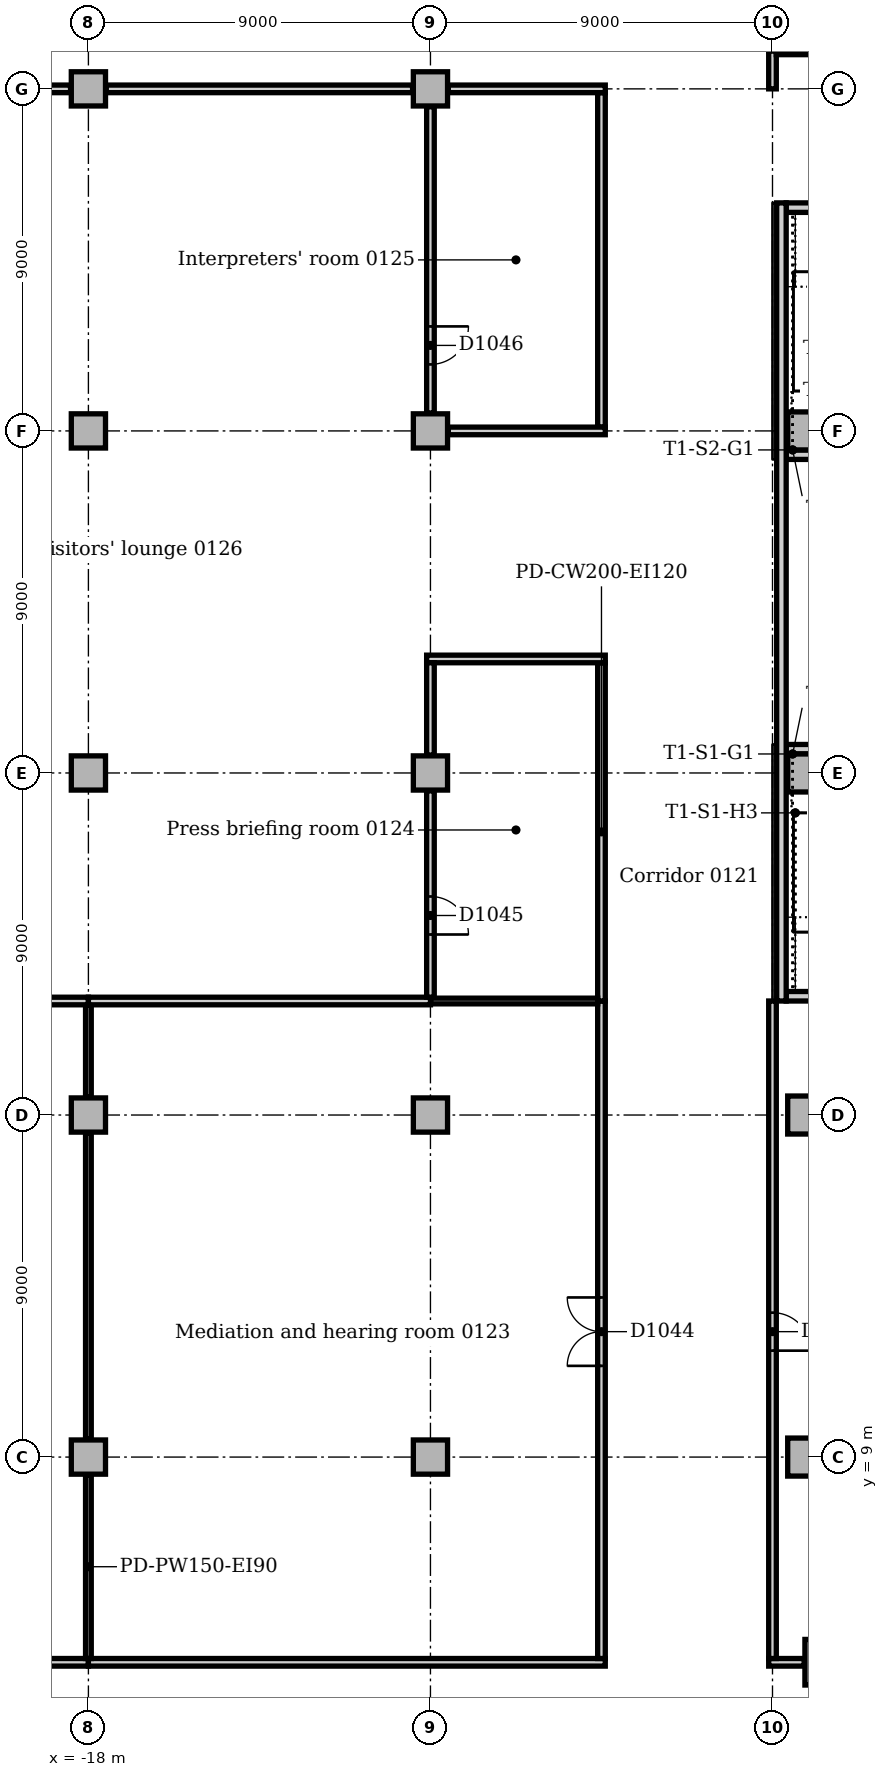
"""IFC4 building model, lengths in metres.
Left out: names, types, materials, properties, quantities, classifications, styles, units other than length and angle.
Written with IfcOpenShell. Run it as: python <this file> out.ifc"""

import sys

from ifc_helpers import new_model, si_unit, direction, frame, frame_2d, origin, origin_2d, place, context, subcontext, project, spatial, rectangle, extrude, element, fill, save


model = new_model("IFC4")
c1 = context("Model", 3, precision=1e-05, world=origin(), true_north=direction((0.0, 1.0)))
c2 = subcontext(c1, "Body", "Model", "MODEL_VIEW")
j1 = project(units=[si_unit("LENGTHUNIT", "METRE"), si_unit("PLANEANGLEUNIT", "RADIAN")], contexts=[c1])
p1 = place(None, origin())
s1 = spatial("IfcSite", under=j1, at=p1, CompositionType="ELEMENT")
p2 = place(p1, origin())
s2 = spatial("IfcBuilding", under=s1, at=p2, CompositionType="ELEMENT")
p3 = place(p2, frame((0.0, 0.0, 6.0)))
s3 = spatial("IfcBuildingStorey", under=s2, at=p3, CompositionType="ELEMENT", Elevation=6.0)
p4 = place(p3, frame((0.36, 21.125, 0.0), z_axis=(0.0, 0.0, 1.0), x_axis=(1.0, 0.0, 0.0)))
e1 = element("IfcWall", 1, at=p4, inside=s3, PredefinedType="SOLIDWALL", context=c2, shape_type="SweptSolid", body=[
    extrude(rectangle(XDim=3.54, YDim=0.25, at=frame_2d((1.77, 0.0))), origin(), (0.0, 0.0, 1.0), 5.0),
])
p5 = place(p3, frame((3.9, 27.625, 0.0), z_axis=(0.0, 0.0, 1.0), x_axis=(-1.0, 0.0, 0.0)))
e2 = element("IfcWall", 2, at=p5, inside=s3, PredefinedType="SOLIDWALL", context=c2, shape_type="SweptSolid", body=[
    extrude(rectangle(XDim=3.54, YDim=0.25, at=frame_2d((1.77, 0.0))), origin(), (0.0, 0.0, 1.0), 5.0),
])
p6 = place(p5, frame((0.4, 0.0, 0.0)))
e3 = element("IfcOpeningElement", 3, at=p6, cuts=e2, PredefinedType="OPENING", context=c2, shape_type="SweptSolid", body=[
    extrude(rectangle(XDim=1.0, YDim=2.1, at=frame_2d((0.5, 1.05))), frame((0.0, 0.135, 0.0), z_axis=(0.0, -1.0, 0.0), x_axis=(1.0, 0.0, 0.0)), (0.0, 0.0, 1.0), 0.27),
])
p7 = place(p3, frame((0.36, 35.375, 0.0), z_axis=(0.0, 0.0, 1.0), x_axis=(1.0, 0.0, 0.0)))
e4 = element("IfcWall", 4, at=p7, inside=s3, PredefinedType="SOLIDWALL", context=c2, shape_type="SweptSolid", body=[
    extrude(rectangle(XDim=3.54, YDim=0.25, at=frame_2d((1.77, 0.0))), origin(), (0.0, 0.0, 1.0), 5.0),
])
p8 = place(p7, frame((2.14, 0.0, 0.0)))
e5 = element("IfcOpeningElement", 5, at=p8, cuts=e4, PredefinedType="OPENING", context=c2, shape_type="SweptSolid", body=[
    extrude(rectangle(XDim=1.0, YDim=2.1, at=frame_2d((0.5, 1.05))), frame((0.0, 0.135, 0.0), z_axis=(0.0, -1.0, 0.0), x_axis=(1.0, 0.0, 0.0)), (0.0, 0.0, 1.0), 0.27),
])
p9 = place(p3, frame((3.9, 41.875, 0.0), z_axis=(0.0, 0.0, 1.0), x_axis=(-1.0, 0.0, 0.0)))
e6 = element("IfcWall", 6, at=p9, inside=s3, PredefinedType="SOLIDWALL", context=c2, shape_type="SweptSolid", body=[
    extrude(rectangle(XDim=3.54, YDim=0.25, at=frame_2d((1.77, 0.0))), origin(), (0.0, 0.0, 1.0), 5.0),
])
p10 = place(p3, frame((0.235, 21.0, 0.0), z_axis=(0.0, 0.0, 1.0), x_axis=(0.0, 1.0, 0.0)))
e7 = element("IfcWall", 7, at=p10, inside=s3, PredefinedType="SOLIDWALL", context=c2, shape_type="SweptSolid", body=[
    extrude(rectangle(XDim=21.0, YDim=0.25, at=frame_2d((10.5, 0.0))), origin(), (0.0, 0.0, 1.0), 5.0),
])
p11 = place(p3, frame((1.453, 3.602, 0.0), z_axis=(0.0, 0.0, 1.0), x_axis=(1.0, 0.0, 0.0)))
e8 = element("IfcColumn", 8, at=p11, inside=s3, PredefinedType="COLUMN", context=c2, shape_type="SweptSolid", body=[
    extrude(rectangle(XDim=1.2, YDim=1.2, at=origin_2d()), origin(), (0.0, 0.0, 1.0), 4.7),
])
for number, where, z_axis, x_axis in (
    (9, (0.9, 9.0, 0.0), (0.0, 0.0, 1.0), (1.0, 0.0, 0.0)),
    (10, (0.9, 18.0, 0.0), (0.0, 0.0, 1.0), (1.0, 0.0, 0.0)),
):
    element("IfcColumn", number, at=place(p3, frame(where, z_axis=z_axis, x_axis=x_axis)), inside=s3, PredefinedType="COLUMN", context=c2, shape_type="SweptSolid", body=[
        extrude(rectangle(XDim=1.0, YDim=1.0, at=origin_2d()), origin(), (0.0, 0.0, 1.0), 4.7),
    ])
for number, where, z_axis, x_axis in (
    (11, (0.9, 27.0, 0.0), (0.0, 0.0, 1.0), (1.0, 0.0, 0.0)),
    (12, (0.9, 36.0, 0.0), (0.0, 0.0, 1.0), (1.0, 0.0, 0.0)),
):
    element("IfcColumn", number, at=place(p3, frame(where, z_axis=z_axis, x_axis=x_axis)), inside=s3, PredefinedType="COLUMN", context=c2, shape_type="SweptSolid", body=[
        extrude(rectangle(XDim=1.0, YDim=1.0, at=origin_2d()), origin(), (0.0, 0.0, 1.0), 5.0),
    ])
for number, where, z_axis, x_axis in (
    (13, (-18.0, 9.0, 0.0), (0.0, 0.0, 1.0), (1.0, 0.0, 0.0)),
    (14, (-18.0, 18.0, 0.0), (0.0, 0.0, 1.0), (1.0, 0.0, 0.0)),
    (15, (-18.0, 27.0, 0.0), (0.0, 0.0, 1.0), (1.0, 0.0, 0.0)),
    (16, (-18.0, 36.0, 0.0), (0.0, 0.0, 1.0), (1.0, 0.0, 0.0)),
    (17, (-18.0, 45.0, 0.0), (0.0, 0.0, 1.0), (1.0, 0.0, 0.0)),
    (18, (-9.0, 9.0, 0.0), (0.0, 0.0, 1.0), (1.0, 0.0, 0.0)),
    (19, (-9.0, 18.0, 0.0), (0.0, 0.0, 1.0), (1.0, 0.0, 0.0)),
    (20, (-9.0, 27.0, 0.0), (0.0, 0.0, 1.0), (1.0, 0.0, 0.0)),
    (21, (-9.0, 36.0, 0.0), (0.0, 0.0, 1.0), (1.0, 0.0, 0.0)),
    (22, (-9.0, 45.0, 0.0), (0.0, 0.0, 1.0), (1.0, 0.0, 0.0)),
):
    element("IfcColumn", number, at=place(p3, frame(where, z_axis=z_axis, x_axis=x_axis)), inside=s3, PredefinedType="COLUMN", context=c2, shape_type="SweptSolid", body=[
        extrude(rectangle(XDim=0.9, YDim=0.9, at=origin_2d()), origin(), (0.0, 0.0, 1.0), 4.7),
    ])
p12 = place(p3, frame((-0.1, 3.6, 0.0), z_axis=(0.0, 0.0, 1.0), x_axis=(1.0, 0.0, 0.0)))
e23 = element("IfcWall", 23, at=p12, inside=s3, PredefinedType="PARTITIONING", context=c2, shape_type="SweptSolid", body=[
    extrude(rectangle(XDim=0.933, YDim=0.2, at=frame_2d((0.467, 0.0))), origin(), (0.0, 0.0, 1.0), 4.7),
])
p13 = place(p3, frame((0.0, 45.0, 0.0), z_axis=(0.0, 0.0, 1.0), x_axis=(0.0, 1.0, 0.0)))
e24 = element("IfcWall", 24, at=p13, inside=s3, PredefinedType="PARTITIONING", context=c2, shape_type="SweptSolid", body=[
    extrude(rectangle(XDim=1.0, YDim=0.2, at=frame_2d((0.5, 0.0))), origin(), (0.0, 0.0, 1.0), 4.7),
])
p14 = place(p3, frame((0.1, 46.0, 0.0), z_axis=(0.0, 0.0, 1.0), x_axis=(1.0, 0.0, 0.0)))
e25 = element("IfcWall", 25, at=p14, inside=s3, PredefinedType="PARTITIONING", context=c2, shape_type="SweptSolid", body=[
    extrude(rectangle(XDim=8.9, YDim=0.2, at=frame_2d((4.45, 0.0))), origin(), (0.0, 0.0, 1.0), 4.7),
])
p15 = place(p14, frame((3.9, 0.0, 0.0)))
e26 = element("IfcOpeningElement", 26, at=p15, cuts=e25, PredefinedType="OPENING", context=c2, shape_type="SweptSolid", body=[
    extrude(rectangle(XDim=1.0, YDim=2.1, at=frame_2d((0.5, 1.05))), frame((0.0, 0.11, 0.0), z_axis=(0.0, -1.0, 0.0), x_axis=(1.0, 0.0, 0.0)), (0.0, 0.0, 1.0), 0.22),
])
p16 = place(p3, frame((-27.0, 3.6, 0.0), z_axis=(0.0, 0.0, 1.0), x_axis=(1.0, 0.0, 0.0)))
e27 = element("IfcWall", 27, at=p16, inside=s3, PredefinedType="PARTITIONING", context=c2, shape_type="SweptSolid", body=[
    extrude(rectangle(XDim=9.0, YDim=0.2, at=frame_2d((4.5, 0.0))), origin(), (0.0, 0.0, 1.0), 4.7),
])
p17 = place(p16, frame((4.0, 0.0, 0.0)))
e28 = element("IfcOpeningElement", 28, at=p17, cuts=e27, PredefinedType="OPENING", context=c2, shape_type="SweptSolid", body=[
    extrude(rectangle(XDim=1.0, YDim=2.1, at=frame_2d((0.5, 1.05))), frame((0.0, 0.11, 0.0), z_axis=(0.0, -1.0, 0.0), x_axis=(1.0, 0.0, 0.0)), (0.0, 0.0, 1.0), 0.22),
])
p18 = place(p3, frame((-18.0, 3.6, 0.0), z_axis=(0.0, 0.0, 1.0), x_axis=(1.0, 0.0, 0.0)))
e29 = element("IfcWall", 29, at=p18, inside=s3, PredefinedType="PARTITIONING", context=c2, shape_type="SweptSolid", body=[
    extrude(rectangle(XDim=13.6, YDim=0.2, at=frame_2d((6.8, 0.0))), origin(), (0.0, 0.0, 1.0), 4.7),
])
p19 = place(p3, frame((-4.5, 3.7, 0.0), z_axis=(0.0, 0.0, 1.0), x_axis=(0.0, 1.0, 0.0)))
e30 = element("IfcWall", 30, at=p19, inside=s3, PredefinedType="PARTITIONING", context=c2, shape_type="SweptSolid", body=[
    extrude(rectangle(XDim=17.3, YDim=0.2, at=frame_2d((8.65, 0.0))), origin(), (0.0, 0.0, 1.0), 4.7),
])
p20 = place(p19, frame((7.7, 0.0, 0.0)))
e31 = element("IfcOpeningElement", 31, at=p20, cuts=e30, PredefinedType="OPENING", context=c2, shape_type="SweptSolid", body=[
    extrude(rectangle(XDim=1.8, YDim=2.1, at=frame_2d((0.9, 1.05))), frame((0.0, 0.11, 0.0), z_axis=(0.0, -1.0, 0.0), x_axis=(1.0, 0.0, 0.0)), (0.0, 0.0, 1.0), 0.22),
])
p21 = place(p3, frame((-4.5, 21.0, 0.0), z_axis=(0.0, 0.0, 1.0), x_axis=(0.0, 1.0, 0.0)))
e32 = element("IfcWall", 32, at=p21, inside=s3, PredefinedType="PARTITIONING", context=c2, shape_type="SweptSolid", body=[
    extrude(rectangle(XDim=8.9, YDim=0.2, at=frame_2d((4.45, 0.0))), origin(), (0.0, 0.0, 1.0), 4.7),
])
p22 = place(p3, frame((-4.5, 36.1, 0.0), z_axis=(0.0, 0.0, 1.0), x_axis=(0.0, 1.0, 0.0)))
e33 = element("IfcWall", 33, at=p22, inside=s3, PredefinedType="PARTITIONING", context=c2, shape_type="SweptSolid", body=[
    extrude(rectangle(XDim=8.8, YDim=0.2, at=frame_2d((4.4, 0.0))), origin(), (0.0, 0.0, 1.0), 4.7),
])
p23 = place(p3, frame((0.0, 3.7, 0.0), z_axis=(0.0, 0.0, 1.0), x_axis=(0.0, 1.0, 0.0)))
e34 = element("IfcWall", 34, at=p23, inside=s3, PredefinedType="PARTITIONING", context=c2, shape_type="SweptSolid", body=[
    extrude(rectangle(XDim=17.3, YDim=0.2, at=frame_2d((8.65, 0.0))), origin(), (0.0, 0.0, 1.0), 4.7),
])
p24 = place(p23, frame((8.1, 0.0, 0.0)))
e35 = element("IfcOpeningElement", 35, at=p24, cuts=e34, PredefinedType="OPENING", context=c2, shape_type="SweptSolid", body=[
    extrude(rectangle(XDim=1.0, YDim=2.1, at=frame_2d((0.5, 1.05))), frame((0.0, 0.11, 0.0), z_axis=(0.0, -1.0, 0.0), x_axis=(1.0, 0.0, 0.0)), (0.0, 0.0, 1.0), 0.22),
])
p25 = place(p3, frame((-18.0, 3.7, 0.0), z_axis=(0.0, 0.0, 1.0), x_axis=(0.0, 1.0, 0.0)))
e36 = element("IfcWall", 36, at=p25, inside=s3, PredefinedType="PARTITIONING", context=c2, shape_type="SweptSolid", body=[
    extrude(rectangle(XDim=4.83, YDim=0.15, at=frame_2d((2.415, 0.0))), origin(), (0.0, 0.0, 1.0), 4.7),
])
p26 = place(p3, frame((-18.0, 9.47, 0.0), z_axis=(0.0, 0.0, 1.0), x_axis=(0.0, 1.0, 0.0)))
e37 = element("IfcWall", 37, at=p26, inside=s3, PredefinedType="PARTITIONING", context=c2, shape_type="SweptSolid", body=[
    extrude(rectangle(XDim=8.06, YDim=0.15, at=frame_2d((4.03, 0.0))), origin(), (0.0, 0.0, 1.0), 4.7),
])
p27 = place(p3, frame((-18.0, 18.47, 0.0), z_axis=(0.0, 0.0, 1.0), x_axis=(0.0, 1.0, 0.0)))
e38 = element("IfcWall", 38, at=p27, inside=s3, PredefinedType="PARTITIONING", context=c2, shape_type="SweptSolid", body=[
    extrude(rectangle(XDim=2.43, YDim=0.15, at=frame_2d((1.215, 0.0))), origin(), (0.0, 0.0, 1.0), 4.7),
])
p28 = place(p3, frame((-27.075, 21.0, 0.0), z_axis=(0.0, 0.0, 1.0), x_axis=(1.0, 0.0, 0.0)))
e39 = element("IfcWall", 39, at=p28, inside=s3, PredefinedType="PARTITIONING", context=c2, shape_type="SweptSolid", body=[
    extrude(rectangle(XDim=9.075, YDim=0.2, at=frame_2d((4.537, 0.0))), origin(), (0.0, 0.0, 1.0), 4.7),
])
p29 = place(p3, frame((-9.0, 21.0, 0.0), z_axis=(0.0, 0.0, 1.0), x_axis=(1.0, 0.0, 0.0)))
e40 = element("IfcWall", 40, at=p29, inside=s3, PredefinedType="PARTITIONING", context=c2, shape_type="SweptSolid", body=[
    extrude(rectangle(XDim=4.4, YDim=0.15, at=frame_2d((2.2, 0.0))), origin(), (0.0, 0.0, 1.0), 4.7),
])
p30 = place(p3, frame((-18.0, 21.0, 0.0), z_axis=(0.0, 0.0, 1.0), x_axis=(1.0, 0.0, 0.0)))
e41 = element("IfcWall", 41, at=p30, inside=s3, PredefinedType="PARTITIONING", context=c2, shape_type="SweptSolid", body=[
    extrude(rectangle(XDim=9.0, YDim=0.2, at=frame_2d((4.5, 0.0))), origin(), (0.0, 0.0, 1.0), 4.7),
])
p31 = place(p3, frame((-9.1, 30.0, 0.0), z_axis=(0.0, 0.0, 1.0), x_axis=(1.0, 0.0, 0.0)))
e42 = element("IfcWall", 42, at=p31, inside=s3, PredefinedType="PARTITIONING", context=c2, shape_type="SweptSolid", body=[
    extrude(rectangle(XDim=4.7, YDim=0.2, at=frame_2d((2.35, 0.0))), origin(), (0.0, 0.0, 1.0), 4.7),
])
p32 = place(p3, frame((-9.0, 21.1, 0.0), z_axis=(0.0, 0.0, 1.0), x_axis=(0.0, 1.0, 0.0)))
e43 = element("IfcWall", 43, at=p32, inside=s3, PredefinedType="PARTITIONING", context=c2, shape_type="SweptSolid", body=[
    extrude(rectangle(XDim=5.43, YDim=0.2, at=frame_2d((2.715, 0.0))), origin(), (0.0, 0.0, 1.0), 4.7),
])
p33 = place(p32, frame((1.65, 0.0, 0.0)))
e44 = element("IfcOpeningElement", 44, at=p33, cuts=e43, PredefinedType="OPENING", context=c2, shape_type="SweptSolid", body=[
    extrude(rectangle(XDim=1.0, YDim=2.1, at=frame_2d((0.5, 1.05))), frame((0.0, 0.11, 0.0), z_axis=(0.0, -1.0, 0.0), x_axis=(1.0, 0.0, 0.0)), (0.0, 0.0, 1.0), 0.22),
])
p34 = place(p3, frame((-9.0, 27.47, 0.0), z_axis=(0.0, 0.0, 1.0), x_axis=(0.0, 1.0, 0.0)))
e45 = element("IfcWall", 45, at=p34, inside=s3, PredefinedType="PARTITIONING", context=c2, shape_type="SweptSolid", body=[
    extrude(rectangle(XDim=2.43, YDim=0.2, at=frame_2d((1.215, 0.0))), origin(), (0.0, 0.0, 1.0), 4.7),
])
p35 = place(p3, frame((-8.53, 36.0, 0.0), z_axis=(0.0, 0.0, 1.0), x_axis=(1.0, 0.0, 0.0)))
e46 = element("IfcWall", 46, at=p35, inside=s3, PredefinedType="PARTITIONING", context=c2, shape_type="SweptSolid", body=[
    extrude(rectangle(XDim=4.13, YDim=0.2, at=frame_2d((2.065, 0.0))), origin(), (0.0, 0.0, 1.0), 4.7),
])
p36 = place(p3, frame((-9.0, 36.47, 0.0), z_axis=(0.0, 0.0, 1.0), x_axis=(0.0, 1.0, 0.0)))
e47 = element("IfcWall", 47, at=p36, inside=s3, PredefinedType="PARTITIONING", context=c2, shape_type="SweptSolid", body=[
    extrude(rectangle(XDim=8.06, YDim=0.2, at=frame_2d((4.03, 0.0))), origin(), (0.0, 0.0, 1.0), 4.7),
])
p37 = place(p36, frame((1.28, 0.0, 0.0)))
e48 = element("IfcOpeningElement", 48, at=p37, cuts=e47, PredefinedType="OPENING", context=c2, shape_type="SweptSolid", body=[
    extrude(rectangle(XDim=1.0, YDim=2.1, at=frame_2d((0.5, 1.05))), frame((0.0, 0.11, 0.0), z_axis=(0.0, -1.0, 0.0), x_axis=(1.0, 0.0, 0.0)), (0.0, 0.0, 1.0), 0.22),
])
p38 = place(p3, frame((-8.53, 45.0, 0.0), z_axis=(0.0, 0.0, 1.0), x_axis=(1.0, 0.0, 0.0)))
e49 = element("IfcWall", 49, at=p38, inside=s3, PredefinedType="PARTITIONING", context=c2, shape_type="SweptSolid", body=[
    extrude(rectangle(XDim=4.13, YDim=0.2, at=frame_2d((2.065, 0.0))), origin(), (0.0, 0.0, 1.0), 4.7),
])
p39 = place(p3, frame((-26.9, 45.0, 0.0), z_axis=(0.0, 0.0, 1.0), x_axis=(1.0, 0.0, 0.0)))
e50 = element("IfcWall", 50, at=p39, inside=s3, PredefinedType="PARTITIONING", context=c2, shape_type="SweptSolid", body=[
    extrude(rectangle(XDim=8.43, YDim=0.2, at=frame_2d((4.215, 0.0))), origin(), (0.0, 0.0, 1.0), 4.7),
])
p40 = place(p3, frame((-17.53, 45.0, 0.0), z_axis=(0.0, 0.0, 1.0), x_axis=(1.0, 0.0, 0.0)))
e51 = element("IfcWall", 51, at=p40, inside=s3, PredefinedType="PARTITIONING", context=c2, shape_type="SweptSolid", body=[
    extrude(rectangle(XDim=8.06, YDim=0.2, at=frame_2d((4.03, 0.0))), origin(), (0.0, 0.0, 1.0), 4.7),
])
for number, where, z_axis, x_axis in (
    (52, (0.48, 21.25, 0.0), (0.0, 0.0, 1.0), (0.0, 1.0, 0.0)),
    (53, (0.48, 39.795, 0.0), (0.0, 0.0, 1.0), (0.0, 1.0, 0.0)),
):
    element("IfcWall", number, at=place(p3, frame(where, z_axis=z_axis, x_axis=x_axis)), inside=s3, PredefinedType="STANDARD", context=c2, shape_type="SweptSolid", body=[
        extrude(rectangle(XDim=1.955, YDim=0.24, at=frame_2d((0.978, 0.0))), origin(), (0.0, 0.0, 1.0), 5.0),
    ])
p41 = place(p20, origin())
e54 = element("IfcDoor", 54, at=p41, inside=s3, OperationType="DOUBLE_DOOR_SINGLE_SWING", PredefinedType="DOOR", context=c2, shape_type="SweptSolid", body=[
    extrude(rectangle(XDim=1.8, YDim=2.1, at=frame_2d((0.9, 1.05))), frame((0.0, 0.025, 0.0), z_axis=(0.0, -1.0, 0.0), x_axis=(1.0, 0.0, 0.0)), (0.0, 0.0, 1.0), 0.05),
])
fill(e31, e54)
p42 = place(p33, frame((1.0, 0.0, 0.0), z_axis=(0.0, 0.0, 1.0), x_axis=(-1.0, 0.0, 0.0)))
e55 = element("IfcDoor", 55, at=p42, inside=s3, OperationType="SINGLE_SWING_RIGHT", PredefinedType="DOOR", context=c2, shape_type="SweptSolid", body=[
    extrude(rectangle(XDim=1.0, YDim=2.1, at=frame_2d((0.5, 1.05))), frame((0.0, 0.025, 0.0), z_axis=(0.0, -1.0, 0.0), x_axis=(1.0, 0.0, 0.0)), (0.0, 0.0, 1.0), 0.05),
])
fill(e44, e55)
p43 = place(p37, frame((1.0, 0.0, 0.0), z_axis=(0.0, 0.0, 1.0), x_axis=(-1.0, 0.0, 0.0)))
e56 = element("IfcDoor", 56, at=p43, inside=s3, OperationType="SINGLE_SWING_LEFT", PredefinedType="DOOR", context=c2, shape_type="SweptSolid", body=[
    extrude(rectangle(XDim=1.0, YDim=2.1, at=frame_2d((0.5, 1.05))), frame((0.0, 0.025, 0.0), z_axis=(0.0, -1.0, 0.0), x_axis=(1.0, 0.0, 0.0)), (0.0, 0.0, 1.0), 0.05),
])
fill(e48, e56)
p44 = place(p24, frame((1.0, 0.0, 0.0), z_axis=(0.0, 0.0, 1.0), x_axis=(-1.0, 0.0, 0.0)))
e57 = element("IfcDoor", 57, at=p44, inside=s3, OperationType="SINGLE_SWING_RIGHT", PredefinedType="DOOR", context=c2, shape_type="SweptSolid", body=[
    extrude(rectangle(XDim=1.0, YDim=2.1, at=frame_2d((0.5, 1.05))), frame((0.0, 0.025, 0.0), z_axis=(0.0, -1.0, 0.0), x_axis=(1.0, 0.0, 0.0)), (0.0, 0.0, 1.0), 0.05),
])
fill(e35, e57)
save(model, sys.argv[1])
